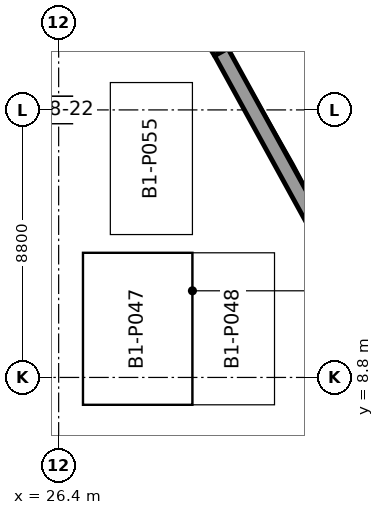
"""IFC4 building model, lengths in metres.
Left out: names, types, materials, properties, quantities, classifications, styles, units other than length and angle.
Written with IfcOpenShell. Run it as: python <this file> out.ifc"""

import sys

from ifc_helpers import new_model, si_unit, direction, frame, frame_2d, origin, origin_2d, place, context, subcontext, project, spatial, rectangle, extrude, element, save


model = new_model("IFC4")
c1 = context("Model", 3, precision=1e-05, world=origin(), true_north=direction((0.0, 1.0)))
c2 = subcontext(c1, "Body", "Model", "MODEL_VIEW")
j1 = project(units=[si_unit("LENGTHUNIT", "METRE"), si_unit("PLANEANGLEUNIT", "RADIAN")], contexts=[c1])
p1 = place(None, origin())
s1 = spatial("IfcSite", under=j1, at=p1, CompositionType="ELEMENT")
p2 = place(p1, origin())
s2 = spatial("IfcBuilding", under=s1, at=p2, CompositionType="ELEMENT")
p3 = place(p2, frame((0.0, 0.0, -4.5)))
s3 = spatial("IfcBuildingStorey", under=s2, at=p3, CompositionType="ELEMENT", Elevation=-4.5)
p4 = place(p3, frame((26.4, 17.6, 0.0), z_axis=(0.0, 0.0, 1.0), x_axis=(1.0, 0.0, 0.0)))
e1 = element("IfcColumn", 1, at=p4, inside=s3, PredefinedType="COLUMN", context=c2, shape_type="SweptSolid", body=[
    extrude(rectangle(XDim=0.8, YDim=0.8, at=origin_2d()), origin(), (0.0, 0.0, 1.0), 4.15),
])
p5 = place(p3, frame((31.748, 19.503, 0.0), z_axis=(0.0, 0.0, 1.0), x_axis=(0.481899167074, -0.876226678876, 0.0)))
e2 = element("IfcWall", 2, at=p5, inside=s3, PredefinedType="SOLIDWALL", context=c2, shape_type="SweptSolid", body=[
    extrude(rectangle(XDim=8.615, YDim=0.5, at=frame_2d((4.307, 0.0))), origin(), (0.0, 0.0, 1.0), 4.5),
])
p6 = place(p3, frame((29.48, 23.143, 0.0), z_axis=(0.0, 0.0, 1.0), x_axis=(0.528796031192, -0.848748936609, 0.0)))
e3 = element("IfcWall", 3, at=p6, inside=s3, PredefinedType="SOLIDWALL", context=c2, shape_type="SweptSolid", body=[
    extrude(rectangle(XDim=4.289, YDim=0.5, at=frame_2d((2.145, 0.0))), origin(), (0.0, 0.0, 1.0), 4.5),
])
save(model, sys.argv[1])
